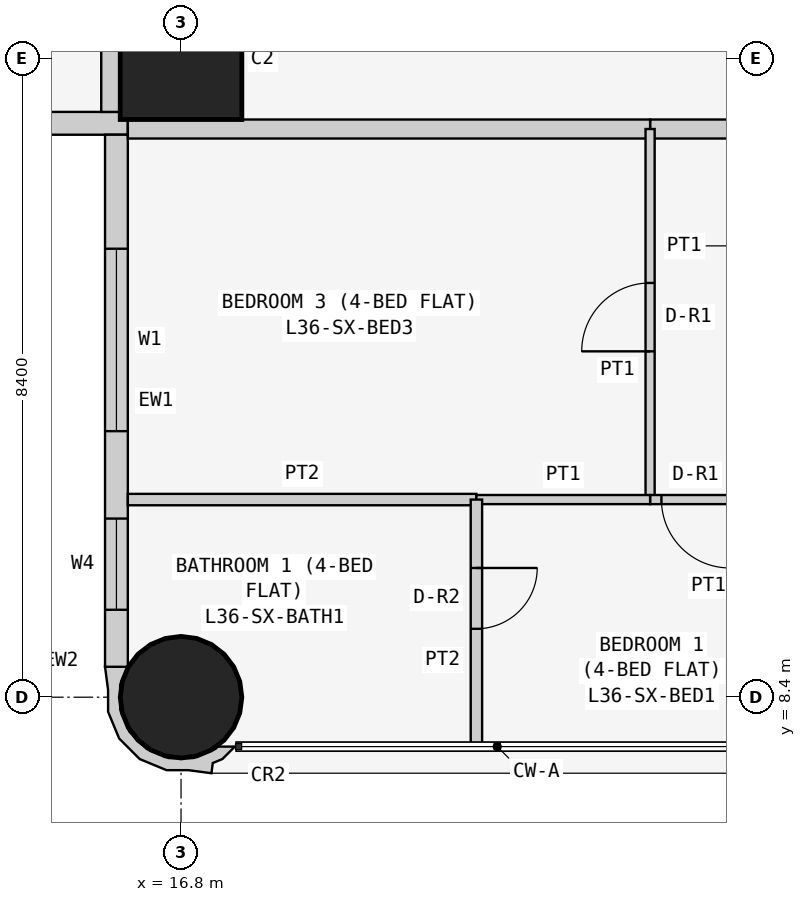
"""IFC4 building model, lengths in metres.
Left out: names, types, materials, properties, quantities, classifications, styles, units other than length and angle.
Written with IfcOpenShell. Run it as: python <this file> out.ifc"""

import sys

from ifc_helpers import new_model, si_unit, direction, frame, frame_2d, origin, origin_2d, place, context, subcontext, project, spatial, polyline, rectangle, circle, outline, extrude, element, fill, save


model = new_model("IFC4")
c1 = context("Model", 3, precision=1e-05, world=origin(), true_north=direction((0.0, 1.0)))
c2 = subcontext(c1, "Body", "Model", "MODEL_VIEW")
j1 = project(units=[si_unit("LENGTHUNIT", "METRE"), si_unit("PLANEANGLEUNIT", "RADIAN")], contexts=[c1])
p1 = place(None, origin())
s1 = spatial("IfcSite", under=j1, at=p1, CompositionType="ELEMENT")
p2 = place(p1, origin())
s2 = spatial("IfcBuilding", under=s1, at=p2, CompositionType="ELEMENT")
p3 = place(p2, frame((0.0, 0.0, 141.3)))
s3 = spatial("IfcBuildingStorey", under=s2, at=p3, CompositionType="ELEMENT", Elevation=141.3)
p4 = place(p3, frame((16.8, 8.4, 0.0), z_axis=(0.0, 0.0, 1.0), x_axis=(1.0, 0.0, 0.0)))
e1 = element("IfcColumn", 1, at=p4, inside=s3, PredefinedType="COLUMN", context=c2, shape_type="SweptSolid", body=[
    extrude(circle(Radius=0.8, at=origin_2d()), origin(), (0.0, 0.0, 1.0), 3.6),
])
p5 = place(p3, frame((16.8, 16.8, 0.0), z_axis=(0.0, 0.0, 1.0), x_axis=(1.0, 0.0, 0.0)))
e2 = element("IfcColumn", 2, at=p5, inside=s3, PredefinedType="COLUMN", context=c2, shape_type="SweptSolid", body=[
    extrude(rectangle(XDim=1.6, YDim=1.6, at=origin_2d()), origin(), (0.0, 0.0, 1.0), 3.6),
])
p6 = place(p3, frame((0.4, 15.95, 0.0), z_axis=(0.0, 0.0, 1.0), x_axis=(1.0, 0.0, 0.0)))
e3 = element("IfcWall", 3, at=p6, inside=s3, PredefinedType="SOLIDWALL", context=c2, shape_type="SweptSolid", body=[
    extrude(rectangle(XDim=15.7, YDim=0.3, at=frame_2d((7.85, 0.0))), origin(), (0.0, 0.0, 1.0), 3.45),
])
p7 = place(p6, frame((12.4, 0.0, 0.9)))
e4 = element("IfcOpeningElement", 4, at=p7, cuts=e3, PredefinedType="OPENING", context=c2, shape_type="SweptSolid", body=[
    extrude(rectangle(XDim=1.8, YDim=1.5, at=frame_2d((0.9, 0.75))), frame((0.0, 0.16, 0.0), z_axis=(0.0, -1.0, 0.0), x_axis=(1.0, 0.0, 0.0)), (0.0, 0.0, 1.0), 0.32),
])
p8 = place(p6, frame((9.55, 0.0, 1.5)))
e5 = element("IfcOpeningElement", 5, at=p8, cuts=e3, PredefinedType="OPENING", context=c2, shape_type="SweptSolid", body=[
    extrude(rectangle(XDim=0.9, YDim=0.7, at=frame_2d((0.45, 0.35))), frame((0.0, 0.16, 0.0), z_axis=(0.0, -1.0, 0.0), x_axis=(1.0, 0.0, 0.0)), (0.0, 0.0, 1.0), 0.32),
])
p9 = place(p6, frame((5.1, 0.0, 0.9)))
e6 = element("IfcOpeningElement", 6, at=p9, cuts=e3, PredefinedType="OPENING", context=c2, shape_type="SweptSolid", body=[
    extrude(rectangle(XDim=1.8, YDim=1.5, at=frame_2d((0.9, 0.75))), frame((0.0, 0.16, 0.0), z_axis=(0.0, -1.0, 0.0), x_axis=(1.0, 0.0, 0.0)), (0.0, 0.0, 1.0), 0.32),
])
p10 = place(p6, frame((2.0, 0.0, 0.0)))
e7 = element("IfcOpeningElement", 7, at=p10, cuts=e3, PredefinedType="OPENING", context=c2, shape_type="SweptSolid", body=[
    extrude(rectangle(XDim=0.9, YDim=2.4, at=frame_2d((0.45, 1.2))), frame((0.0, 0.16, 0.0), z_axis=(0.0, -1.0, 0.0), x_axis=(1.0, 0.0, 0.0)), (0.0, 0.0, 1.0), 0.32),
])
p11 = place(p6, frame((0.7, 0.0, 0.9)))
e8 = element("IfcOpeningElement", 8, at=p11, cuts=e3, PredefinedType="OPENING", context=c2, shape_type="SweptSolid", body=[
    extrude(rectangle(XDim=1.2, YDim=1.5, at=frame_2d((0.6, 0.75))), frame((0.0, 0.16, 0.0), z_axis=(0.0, -1.0, 0.0), x_axis=(1.0, 0.0, 0.0)), (0.0, 0.0, 1.0), 0.32),
])
p12 = place(p3, frame((15.95, 15.8, 0.0), z_axis=(0.0, 0.0, 1.0), x_axis=(0.0, -1.0, 0.0)))
e9 = element("IfcWall", 9, at=p12, inside=s3, PredefinedType="SOLIDWALL", context=c2, shape_type="SweptSolid", body=[
    extrude(rectangle(XDim=7.0, YDim=0.3, at=frame_2d((3.5, 0.0))), origin(), (0.0, 0.0, 1.0), 3.45),
])
p13 = place(p12, frame((1.5, 0.0, 0.9)))
e10 = element("IfcOpeningElement", 10, at=p13, cuts=e9, PredefinedType="OPENING", context=c2, shape_type="SweptSolid", body=[
    extrude(rectangle(XDim=2.4, YDim=1.5, at=frame_2d((1.2, 0.75))), frame((0.0, 0.16, 0.0), z_axis=(0.0, -1.0, 0.0), x_axis=(1.0, 0.0, 0.0)), (0.0, 0.0, 1.0), 0.32),
])
p14 = place(p12, frame((5.05, 0.0, 0.9)))
e11 = element("IfcOpeningElement", 11, at=p14, cuts=e9, PredefinedType="OPENING", context=c2, shape_type="SweptSolid", body=[
    extrude(rectangle(XDim=1.2, YDim=1.5, at=frame_2d((0.6, 0.75))), frame((0.0, 0.16, 0.0), z_axis=(0.0, -1.0, 0.0), x_axis=(1.0, 0.0, 0.0)), (0.0, 0.0, 1.0), 0.32),
])
p15 = place(p3, frame((15.983, 8.727, 0.0), z_axis=(0.0, 0.0, 1.0), x_axis=(-0.343276641956, -0.93923434088, 0.0)))
e12 = element("IfcWall", 12, at=p15, inside=s3, PredefinedType="SOLIDWALL", context=c2, shape_type="SweptSolid", body=[
    extrude(outline(polyline([(0.829, 1.599), (0.697, 1.569), (0.604, 1.67), (0.394, 1.767), (0.471, 1.556), (0.509, 1.539), (0.724, 1.304), (0.833, 1.005), (0.82, 0.686), (0.686, 0.397), (0.451, 0.182), (0.152, 0.073), (-0.116, 0.084), (-0.127, 0.078), (-0.146, 0.071), (-0.006, -0.197), (0.266, -0.055), (0.535, 0.044), (0.817, 0.302), (0.978, 0.648), (0.994, 1.03), (0.895, 1.3), (0.829, 1.599)])), origin(), (0.0, 0.0, 1.0), 3.45),
])
p16 = place(p3, frame((24.171, 15.875, 0.0), z_axis=(0.0, 0.0, 1.0), x_axis=(-1.0, 0.0, 0.0)))
e13 = element("IfcWall", 13, at=p16, inside=s3, PredefinedType="PARTITIONING", context=c2, shape_type="SweptSolid", body=[
    extrude(rectangle(XDim=1.2, YDim=0.25, at=frame_2d((0.6, 0.0))), origin(), (0.0, 0.0, 1.0), 3.45),
])
p17 = place(p3, frame((22.971, 15.875, 0.0), z_axis=(0.0, 0.0, 1.0), x_axis=(-1.0, 0.0, 0.0)))
e14 = element("IfcWall", 14, at=p17, inside=s3, PredefinedType="PARTITIONING", context=c2, shape_type="SweptSolid", body=[
    extrude(rectangle(XDim=6.871, YDim=0.25, at=frame_2d((3.436, 0.0))), origin(), (0.0, 0.0, 1.0), 3.45),
])
p18 = place(p3, frame((15.875, 16.1, 0.0), z_axis=(0.0, 0.0, 1.0), x_axis=(0.0, 1.0, 0.0)))
e15 = element("IfcWall", 15, at=p18, inside=s3, PredefinedType="PARTITIONING", context=c2, shape_type="SweptSolid", body=[
    extrude(rectangle(XDim=6.471, YDim=0.25, at=frame_2d((3.235, 0.0))), origin(), (0.0, 0.0, 1.0), 3.45),
])
p19 = place(p3, frame((22.971, 11.0, 0.0), z_axis=(0.0, 0.0, 1.0), x_axis=(0.0, 1.0, 0.0)))
e16 = element("IfcWall", 16, at=p19, inside=s3, PredefinedType="PARTITIONING", context=c2, shape_type="SweptSolid", body=[
    extrude(rectangle(XDim=4.875, YDim=0.12, at=frame_2d((2.438, 0.0))), origin(), (0.0, 0.0, 1.0), 3.45),
])
p20 = place(p19, frame((1.95, 0.0, 0.0)))
e17 = element("IfcOpeningElement", 17, at=p20, cuts=e16, PredefinedType="OPENING", context=c2, shape_type="SweptSolid", body=[
    extrude(rectangle(XDim=0.9, YDim=2.1, at=frame_2d((0.45, 1.05))), frame((0.0, 0.07, 0.0), z_axis=(0.0, -1.0, 0.0), x_axis=(1.0, 0.0, 0.0)), (0.0, 0.0, 1.0), 0.14),
])
p21 = place(p3, frame((24.171, 11.0, 0.0), z_axis=(0.0, 0.0, 1.0), x_axis=(-1.0, 0.0, 0.0)))
e18 = element("IfcWall", 18, at=p21, inside=s3, PredefinedType="PARTITIONING", context=c2, shape_type="SweptSolid", body=[
    extrude(rectangle(XDim=1.2, YDim=0.12, at=frame_2d((0.6, 0.0))), origin(), (0.0, 0.0, 1.0), 3.45),
])
p22 = place(p21, frame((0.151, 0.0, 0.0)))
e19 = element("IfcOpeningElement", 19, at=p22, cuts=e18, PredefinedType="OPENING", context=c2, shape_type="SweptSolid", body=[
    extrude(rectangle(XDim=0.9, YDim=2.1, at=frame_2d((0.45, 1.05))), frame((0.0, 0.07, 0.0), z_axis=(0.0, -1.0, 0.0), x_axis=(1.0, 0.0, 0.0)), (0.0, 0.0, 1.0), 0.14),
])
p23 = place(p3, frame((16.1, 11.0, 0.0), z_axis=(0.0, 0.0, 1.0), x_axis=(1.0, 0.0, 0.0)))
e20 = element("IfcWall", 20, at=p23, inside=s3, PredefinedType="PARTITIONING", context=c2, shape_type="SweptSolid", body=[
    extrude(rectangle(XDim=4.586, YDim=0.15, at=frame_2d((2.293, 0.0))), origin(), (0.0, 0.0, 1.0), 3.45),
])
p24 = place(p3, frame((20.686, 11.0, 0.0), z_axis=(0.0, 0.0, 1.0), x_axis=(1.0, 0.0, 0.0)))
e21 = element("IfcWall", 21, at=p24, inside=s3, PredefinedType="PARTITIONING", context=c2, shape_type="SweptSolid", body=[
    extrude(rectangle(XDim=2.285, YDim=0.12, at=frame_2d((1.143, 0.0))), origin(), (0.0, 0.0, 1.0), 3.45),
])
p25 = place(p3, frame((20.686, 7.75, 0.0), z_axis=(0.0, 0.0, 1.0), x_axis=(0.0, 1.0, 0.0)))
e22 = element("IfcWall", 22, at=p25, inside=s3, PredefinedType="PARTITIONING", context=c2, shape_type="SweptSolid", body=[
    extrude(rectangle(XDim=3.25, YDim=0.15, at=frame_2d((1.625, 0.0))), origin(), (0.0, 0.0, 1.0), 3.45),
])
p26 = place(p25, frame((1.55, 0.0, 0.0)))
e23 = element("IfcOpeningElement", 23, at=p26, cuts=e22, PredefinedType="OPENING", context=c2, shape_type="SweptSolid", body=[
    extrude(rectangle(XDim=0.8, YDim=2.1, at=frame_2d((0.4, 1.05))), frame((0.0, 0.085, 0.0), z_axis=(0.0, -1.0, 0.0), x_axis=(1.0, 0.0, 0.0)), (0.0, 0.0, 1.0), 0.17),
])
p27 = place(p13, origin())
e24 = element("IfcWindow", 24, at=p27, inside=s3, PartitioningType="SINGLE_PANEL", PredefinedType="WINDOW", context=c2, shape_type="SweptSolid", body=[
    extrude(rectangle(XDim=2.4, YDim=1.5, at=frame_2d((1.2, 0.75))), frame((0.0, 0.03, 0.0), z_axis=(0.0, -1.0, 0.0), x_axis=(1.0, 0.0, 0.0)), (0.0, 0.0, 1.0), 0.06),
])
fill(e10, e24)
p28 = place(p14, origin())
e25 = element("IfcWindow", 25, at=p28, inside=s3, PartitioningType="SINGLE_PANEL", PredefinedType="WINDOW", context=c2, shape_type="SweptSolid", body=[
    extrude(rectangle(XDim=1.2, YDim=1.5, at=frame_2d((0.6, 0.75))), frame((0.0, 0.03, 0.0), z_axis=(0.0, -1.0, 0.0), x_axis=(1.0, 0.0, 0.0)), (0.0, 0.0, 1.0), 0.06),
])
fill(e11, e25)
p29 = place(p20, origin())
e26 = element("IfcDoor", 26, at=p29, inside=s3, OperationType="SINGLE_SWING_LEFT", PredefinedType="DOOR", context=c2, shape_type="SweptSolid", body=[
    extrude(rectangle(XDim=0.9, YDim=2.1, at=frame_2d((0.45, 1.05))), frame((0.0, 0.025, 0.0), z_axis=(0.0, -1.0, 0.0), x_axis=(1.0, 0.0, 0.0)), (0.0, 0.0, 1.0), 0.05),
])
fill(e17, e26)
p30 = place(p22, origin())
e27 = element("IfcDoor", 27, at=p30, inside=s3, OperationType="SINGLE_SWING_LEFT", PredefinedType="DOOR", context=c2, shape_type="SweptSolid", body=[
    extrude(rectangle(XDim=0.9, YDim=2.1, at=frame_2d((0.45, 1.05))), frame((0.0, 0.025, 0.0), z_axis=(0.0, -1.0, 0.0), x_axis=(1.0, 0.0, 0.0)), (0.0, 0.0, 1.0), 0.05),
])
fill(e19, e27)
p31 = place(p26, frame((0.8, 0.0, 0.0), z_axis=(0.0, 0.0, 1.0), x_axis=(-1.0, 0.0, 0.0)))
e28 = element("IfcDoor", 28, at=p31, inside=s3, OperationType="SINGLE_SWING_LEFT", PredefinedType="DOOR", context=c2, shape_type="SweptSolid", body=[
    extrude(rectangle(XDim=0.8, YDim=2.1, at=frame_2d((0.4, 1.05))), frame((0.0, 0.025, 0.0), z_axis=(0.0, -1.0, 0.0), x_axis=(1.0, 0.0, 0.0)), (0.0, 0.0, 1.0), 0.05),
])
fill(e23, e28)
save(model, sys.argv[1])
